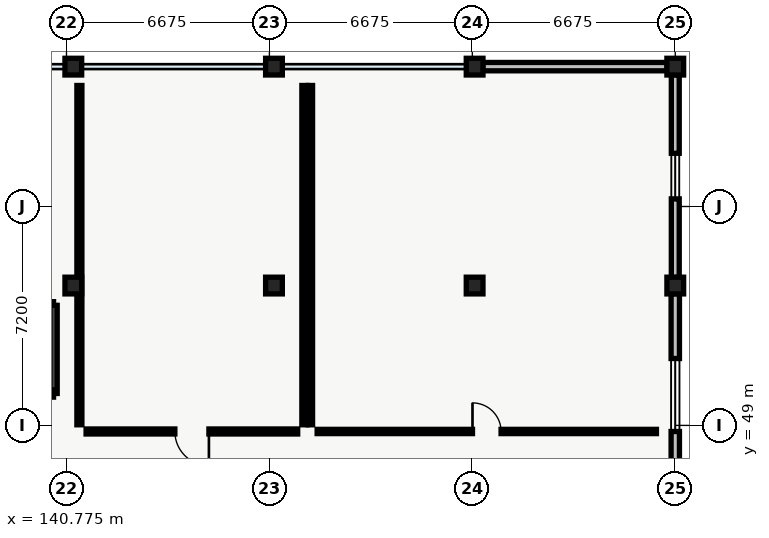
"""IFC4 building model, lengths in metres.
Left out: names, types, materials, properties, quantities, classifications, styles, units other than length and angle.
Written with IfcOpenShell. Run it as: python <this file> out.ifc"""

import sys

from ifc_helpers import new_model, si_unit, direction, frame, frame_2d, origin, origin_2d, place, context, subcontext, project, spatial, rectangle, extrude, element, fill, save


model = new_model("IFC4")
c1 = context("Model", 3, precision=1e-05, world=origin(), true_north=direction((0.0, 1.0)))
c2 = subcontext(c1, "Body", "Model", "MODEL_VIEW")
j1 = project(units=[si_unit("LENGTHUNIT", "METRE"), si_unit("PLANEANGLEUNIT", "RADIAN")], contexts=[c1])
p1 = place(None, origin())
s1 = spatial("IfcSite", under=j1, at=p1, CompositionType="ELEMENT")
p2 = place(p1, origin())
s2 = spatial("IfcBuilding", under=s1, at=p2, CompositionType="ELEMENT")
p3 = place(p2, frame((0.0, 0.0, 27.6)))
s3 = spatial("IfcBuildingStorey", under=s2, at=p3, CompositionType="ELEMENT", Elevation=27.6)
for number, where, z_axis, x_axis in (
    (1, (141.0, 53.6, 0.0), (0.0, 0.0, 1.0), (1.0, 0.0, 0.0)),
    (2, (141.0, 60.8, 0.0), (0.0, 0.0, 1.0), (1.0, 0.0, 0.0)),
    (3, (147.6, 53.6, 0.0), (0.0, 0.0, 1.0), (1.0, 0.0, 0.0)),
    (4, (147.6, 60.8, 0.0), (0.0, 0.0, 1.0), (1.0, 0.0, 0.0)),
    (5, (154.2, 53.6, 0.0), (0.0, 0.0, 1.0), (1.0, 0.0, 0.0)),
    (6, (154.2, 60.8, 0.0), (0.0, 0.0, 1.0), (1.0, 0.0, 0.0)),
    (7, (160.8, 53.6, 0.0), (0.0, 0.0, 1.0), (1.0, 0.0, 0.0)),
    (8, (160.8, 60.8, 0.0), (0.0, 0.0, 1.0), (1.0, 0.0, 0.0)),
):
    element("IfcColumn", number, at=place(p3, frame(where, z_axis=z_axis, x_axis=x_axis)), inside=s3, PredefinedType="COLUMN", context=c2, shape_type="SweptSolid", body=[
        extrude(rectangle(XDim=0.55, YDim=0.55, at=origin_2d()), origin(), (0.0, 0.0, 1.0), 4.3),
    ])
p4 = place(p3, frame((154.47, 60.8, 0.0), z_axis=(0.0, 0.0, 1.0), x_axis=(1.0, 0.0, 0.0)))
e9 = element("IfcWall", 9, at=p4, inside=s3, PredefinedType="STANDARD", context=c2, shape_type="SweptSolid", body=[
    extrude(rectangle(XDim=6.06, YDim=0.275, at=frame_2d((3.03, 0.0))), origin(), (0.0, 0.0, 1.0), 3.835),
])
p5 = place(p3, frame((160.8, 60.53, 0.0), z_axis=(0.0, 0.0, 1.0), x_axis=(0.0, -1.0, 0.0)))
e10 = element("IfcWall", 10, at=p5, inside=s3, PredefinedType="STANDARD", context=c2, shape_type="SweptSolid", body=[
    extrude(rectangle(XDim=6.66, YDim=0.26, at=frame_2d((3.33, 0.0))), origin(), (0.0, 0.0, 1.0), 3.835),
])
p6 = place(p5, frame((2.58, 0.0, 0.95)))
e11 = element("IfcOpeningElement", 11, at=p6, cuts=e10, PredefinedType="OPENING", context=c2, shape_type="SweptSolid", body=[
    extrude(rectangle(XDim=1.5, YDim=1.65, at=frame_2d((0.75, 0.825))), frame((0.0, 0.13, 0.0), z_axis=(0.0, -1.0, 0.0), x_axis=(1.0, 0.0, 0.0)), (0.0, 0.0, 1.0), 0.26),
])
p7 = place(p3, frame((160.8, 53.33, 0.0), z_axis=(0.0, 0.0, 1.0), x_axis=(0.0, -1.0, 0.0)))
e12 = element("IfcWall", 12, at=p7, inside=s3, PredefinedType="STANDARD", context=c2, shape_type="SweptSolid", body=[
    extrude(rectangle(XDim=6.66, YDim=0.275, at=frame_2d((3.33, 0.0))), origin(), (0.0, 0.0, 1.0), 3.835),
])
p8 = place(p7, frame((2.13, 0.0, 0.95)))
e13 = element("IfcOpeningElement", 13, at=p8, cuts=e12, PredefinedType="OPENING", context=c2, shape_type="SweptSolid", body=[
    extrude(rectangle(XDim=2.4, YDim=1.65, at=frame_2d((1.2, 0.825))), frame((0.0, 0.137, 0.0), z_axis=(0.0, -1.0, 0.0), x_axis=(1.0, 0.0, 0.0)), (0.0, 0.0, 1.0), 0.275),
])
p9 = place(p3, frame((138.05, 52.95, 0.0), z_axis=(0.0, 0.0, 1.0), x_axis=(1.0, 0.0, 0.0)))
e14 = element("IfcWall", 14, at=p9, inside=s3, PredefinedType="SHEAR", context=c2, shape_type="SweptSolid", body=[
    extrude(rectangle(XDim=2.3, YDim=0.24, at=frame_2d((1.15, 0.0))), origin(), (0.0, 0.0, 1.0), 4.28),
])
p10 = place(p3, frame((140.35, 52.95, 0.0), z_axis=(0.0, 0.0, 1.0), x_axis=(0.0, -1.0, 0.0)))
e15 = element("IfcWall", 15, at=p10, inside=s3, PredefinedType="SHEAR", context=c2, shape_type="SweptSolid", body=[
    extrude(rectangle(XDim=2.9, YDim=0.24, at=frame_2d((1.45, 0.0))), origin(), (0.0, 0.0, 1.0), 4.28),
])
p11 = place(p3, frame((140.35, 50.05, 0.0), z_axis=(0.0, 0.0, 1.0), x_axis=(-1.0, 0.0, 0.0)))
e16 = element("IfcWall", 16, at=p11, inside=s3, PredefinedType="SHEAR", context=c2, shape_type="SweptSolid", body=[
    extrude(rectangle(XDim=2.3, YDim=0.24, at=frame_2d((1.15, 0.0))), origin(), (0.0, 0.0, 1.0), 4.28),
])
p12 = place(p11, frame((0.425, 0.0, 0.0)))
e17 = element("IfcOpeningElement", 17, at=p12, cuts=e16, PredefinedType="OPENING", context=c2, shape_type="SweptSolid", body=[
    extrude(rectangle(XDim=1.45, YDim=2.3, at=frame_2d((0.725, 1.15))), frame((0.0, 0.12, 0.0), z_axis=(0.0, -1.0, 0.0), x_axis=(1.0, 0.0, 0.0)), (0.0, 0.0, 1.0), 0.24),
])
p13 = place(p3, frame((141.42, 48.8, 0.0), z_axis=(0.0, 0.0, 1.0), x_axis=(1.0, 0.0, 0.0)))
e18 = element("IfcWall", 18, at=p13, inside=s3, PredefinedType="PARTITIONING", context=c2, shape_type="SweptSolid", body=[
    extrude(rectangle(XDim=6.96, YDim=0.165, at=frame_2d((3.48, 0.0))), origin(), (0.0, 0.0, 1.0), 3.885),
])
p14 = place(p13, frame((2.92, 0.0, 0.0)))
e19 = element("IfcOpeningElement", 19, at=p14, cuts=e18, PredefinedType="OPENING", context=c2, shape_type="SweptSolid", body=[
    extrude(rectangle(XDim=1.12, YDim=2.1, at=frame_2d((0.56, 1.05))), frame((0.0, 0.083, 0.0), z_axis=(0.0, -1.0, 0.0), x_axis=(1.0, 0.0, 0.0)), (0.0, 0.0, 1.0), 0.165),
])
p15 = place(p3, frame((148.6, 49.02, 0.0), z_axis=(0.0, 0.0, 1.0), x_axis=(0.0, 1.0, 0.0)))
e20 = element("IfcWall", 20, at=p15, inside=s3, PredefinedType="PARTITIONING", context=c2, shape_type="SweptSolid", body=[
    extrude(rectangle(XDim=11.16, YDim=0.165, at=frame_2d((5.58, 0.0))), origin(), (0.0, 0.0, 1.0), 3.95),
])
p16 = place(p3, frame((141.2, 60.18, 0.0), z_axis=(0.0, 0.0, 1.0), x_axis=(0.0, -1.0, 0.0)))
e21 = element("IfcWall", 21, at=p16, inside=s3, PredefinedType="PARTITIONING", context=c2, shape_type="SweptSolid", body=[
    extrude(rectangle(XDim=11.16, YDim=0.165, at=frame_2d((5.58, 0.0))), origin(), (0.0, 0.0, 1.0), 3.685),
])
p17 = place(p3, frame((149.02, 48.8, 0.0), z_axis=(0.0, 0.0, 1.0), x_axis=(1.0, 0.0, 0.0)))
e22 = element("IfcWall", 22, at=p17, inside=s3, PredefinedType="PARTITIONING", context=c2, shape_type="SweptSolid", body=[
    extrude(rectangle(XDim=11.16, YDim=0.14, at=frame_2d((5.58, 0.0))), origin(), (0.0, 0.0, 1.0), 3.885),
])
p18 = place(p17, frame((5.11, 0.0, 0.0)))
e23 = element("IfcOpeningElement", 23, at=p18, cuts=e22, PredefinedType="OPENING", context=c2, shape_type="SweptSolid", body=[
    extrude(rectangle(XDim=0.94, YDim=2.12, at=frame_2d((0.47, 1.06))), frame((0.0, 0.07, 0.0), z_axis=(0.0, -1.0, 0.0), x_axis=(1.0, 0.0, 0.0)), (0.0, 0.0, 1.0), 0.14),
])
p19 = place(p3, frame((148.8, 60.18, 0.0), z_axis=(0.0, 0.0, 1.0), x_axis=(0.0, -1.0, 0.0)))
e24 = element("IfcWall", 24, at=p19, inside=s3, PredefinedType="PARTITIONING", context=c2, shape_type="SweptSolid", body=[
    extrude(rectangle(XDim=11.16, YDim=0.14, at=frame_2d((5.58, 0.0))), origin(), (0.0, 0.0, 1.0), 3.95),
])
p20 = place(p6, origin())
e25 = element("IfcWindow", 25, at=p20, inside=s3, PartitioningType="SINGLE_PANEL", PredefinedType="WINDOW", context=c2, shape_type="SweptSolid", body=[
    extrude(rectangle(XDim=1.5, YDim=1.65, at=frame_2d((0.75, 0.825))), frame((0.0, 0.03, 0.0), z_axis=(0.0, -1.0, 0.0), x_axis=(1.0, 0.0, 0.0)), (0.0, 0.0, 1.0), 0.06),
])
fill(e11, e25)
p21 = place(p8, origin())
e26 = element("IfcWindow", 26, at=p21, inside=s3, PartitioningType="SINGLE_PANEL", PredefinedType="WINDOW", context=c2, shape_type="SweptSolid", body=[
    extrude(rectangle(XDim=2.4, YDim=1.65, at=frame_2d((1.2, 0.825))), frame((0.0, 0.03, 0.0), z_axis=(0.0, -1.0, 0.0), x_axis=(1.0, 0.0, 0.0)), (0.0, 0.0, 1.0), 0.06),
])
fill(e13, e26)
p22 = place(p14, origin())
e27 = element("IfcDoor", 27, at=p22, inside=s3, OperationType="SINGLE_SWING_RIGHT", PredefinedType="DOOR", context=c2, shape_type="SweptSolid", body=[
    extrude(rectangle(XDim=1.12, YDim=2.1, at=frame_2d((0.56, 1.05))), frame((0.0, 0.025, 0.0), z_axis=(0.0, -1.0, 0.0), x_axis=(1.0, 0.0, 0.0)), (0.0, 0.0, 1.0), 0.05),
])
fill(e19, e27)
p23 = place(p18, origin())
e28 = element("IfcDoor", 28, at=p23, inside=s3, OperationType="SINGLE_SWING_LEFT", PredefinedType="DOOR", context=c2, shape_type="SweptSolid", body=[
    extrude(rectangle(XDim=0.94, YDim=2.12, at=frame_2d((0.47, 1.06))), frame((0.0, 0.025, 0.0), z_axis=(0.0, -1.0, 0.0), x_axis=(1.0, 0.0, 0.0)), (0.0, 0.0, 1.0), 0.05),
])
fill(e23, e28)
save(model, sys.argv[1])
